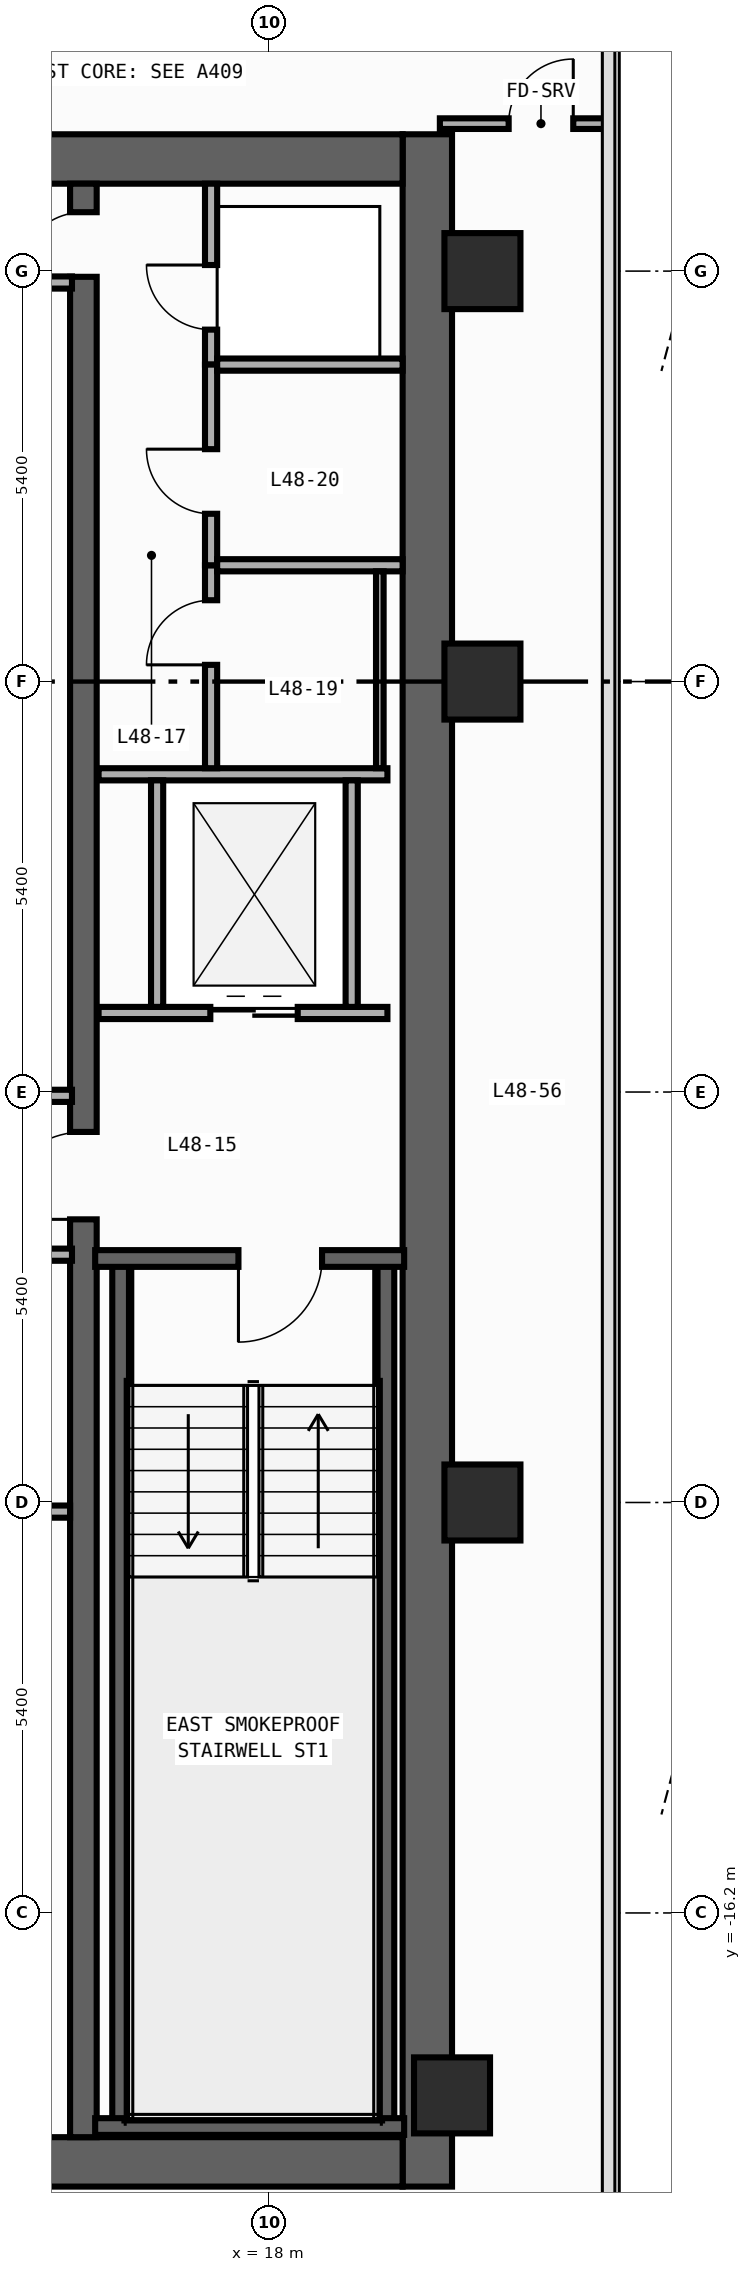
"""IFC4 building model, lengths in metres.
Left out: names, types, materials, properties, quantities, classifications, styles, units other than length and angle.
Written with IfcOpenShell. Run it as: python <this file> out.ifc"""

import sys

from ifc_helpers import new_model, si_unit, direction, frame, frame_2d, origin, origin_2d, place, context, subcontext, project, spatial, rectangle, extrude, element, fill, save


model = new_model("IFC4")
c1 = context("Model", 3, precision=1e-05, world=origin(), true_north=direction((0.0, 1.0)))
c2 = subcontext(c1, "Body", "Model", "MODEL_VIEW")
j1 = project(units=[si_unit("LENGTHUNIT", "METRE"), si_unit("PLANEANGLEUNIT", "RADIAN")], contexts=[c1])
p1 = place(None, origin())
s1 = spatial("IfcSite", under=j1, at=p1, CompositionType="ELEMENT")
p2 = place(p1, origin())
s2 = spatial("IfcBuilding", under=s1, at=p2, CompositionType="ELEMENT")
p3 = place(p2, frame((0.0, 0.0, 206.8)))
s3 = spatial("IfcBuildingStorey", under=s2, at=p3, CompositionType="ELEMENT", Elevation=206.8)
p4 = place(p3, frame((20.075, -19.8, 0.0), z_axis=(0.0, 0.0, 1.0), x_axis=(0.0, 1.0, 0.0)))
e1 = element("IfcWall", 1, at=p4, inside=s3, PredefinedType="SHEAR", context=c2, shape_type="SweptSolid", body=[
    extrude(rectangle(XDim=27.0, YDim=0.65, at=frame_2d((13.5, 0.0))), origin(), (0.0, 0.0, 1.0), 3.54),
])
for number, where, z_axis, x_axis in (
    (2, (12.65, -19.475, 0.0), (0.0, 0.0, 1.0), (1.0, 0.0, 0.0)),
    (3, (12.65, 6.875, 0.0), (0.0, 0.0, 1.0), (1.0, 0.0, 0.0)),
):
    element("IfcWall", number, at=place(p3, frame(where, z_axis=z_axis, x_axis=x_axis)), inside=s3, PredefinedType="SHEAR", context=c2, shape_type="SweptSolid", body=[
        extrude(rectangle(XDim=7.1, YDim=0.65, at=frame_2d((3.55, 0.0))), origin(), (0.0, 0.0, 1.0), 3.54),
    ])
p5 = place(p3, frame((15.55, -19.15, 0.0), z_axis=(0.0, 0.0, 1.0), x_axis=(0.0, 1.0, 0.0)))
e4 = element("IfcWall", 4, at=p5, inside=s3, PredefinedType="SHEAR", context=c2, shape_type="SweptSolid", body=[
    extrude(rectangle(XDim=25.7, YDim=0.35, at=frame_2d((12.85, 0.0))), origin(), (0.0, 0.0, 1.0), 3.54),
])
p6 = place(p5, frame((12.075, 0.0, 0.0)))
e5 = element("IfcOpeningElement", 5, at=p6, cuts=e4, PredefinedType="OPENING", context=c2, shape_type="SweptSolid", body=[
    extrude(rectangle(XDim=1.15, YDim=2.2, at=frame_2d((0.575, 1.1))), frame((0.0, 0.185, 0.0), z_axis=(0.0, -1.0, 0.0), x_axis=(1.0, 0.0, 0.0)), (0.0, 0.0, 1.0), 0.37),
])
p7 = place(p5, frame((24.475, 0.0, 0.0)))
e6 = element("IfcOpeningElement", 6, at=p7, cuts=e4, PredefinedType="OPENING", context=c2, shape_type="SweptSolid", body=[
    extrude(rectangle(XDim=0.85, YDim=2.1, at=frame_2d((0.425, 1.05))), frame((0.0, 0.185, 0.0), z_axis=(0.0, -1.0, 0.0), x_axis=(1.0, 0.0, 0.0)), (0.0, 0.0, 1.0), 0.37),
])
for number, where, z_axis, x_axis in (
    (7, (16.04, -19.01, 0.0), (0.0, 0.0, 1.0), (0.0, 1.0, 0.0)),
    (8, (19.53, -19.01, 0.0), (0.0, 0.0, 1.0), (0.0, 1.0, 0.0)),
):
    element("IfcWall", number, at=place(p3, frame(where, z_axis=z_axis, x_axis=x_axis)), inside=s3, PredefinedType="SHEAR", context=c2, shape_type="SweptSolid", body=[
        extrude(rectangle(XDim=11.42, YDim=0.22, at=frame_2d((5.71, 0.0))), origin(), (0.0, 0.0, 1.0), 3.54),
    ])
p8 = place(p3, frame((15.705, -19.01, 0.0), z_axis=(0.0, 0.0, 1.0), x_axis=(1.0, 0.0, 0.0)))
e9 = element("IfcWall", 9, at=p8, inside=s3, PredefinedType="SHEAR", context=c2, shape_type="SweptSolid", body=[
    extrude(rectangle(XDim=4.065, YDim=0.22, at=frame_2d((2.032, 0.0))), origin(), (0.0, 0.0, 1.0), 3.54),
])
p9 = place(p3, frame((19.77, -7.59, 0.0), z_axis=(0.0, 0.0, 1.0), x_axis=(-1.0, 0.0, 0.0)))
e10 = element("IfcWall", 10, at=p9, inside=s3, PredefinedType="SHEAR", context=c2, shape_type="SweptSolid", body=[
    extrude(rectangle(XDim=4.065, YDim=0.22, at=frame_2d((2.032, 0.0))), origin(), (0.0, 0.0, 1.0), 3.54),
])
p10 = place(p9, frame((1.08, 0.0, 0.0)))
e11 = element("IfcOpeningElement", 11, at=p10, cuts=e10, PredefinedType="OPENING", context=c2, shape_type="SweptSolid", body=[
    extrude(rectangle(XDim=1.1, YDim=2.2, at=frame_2d((0.55, 1.1))), frame((0.0, 0.12, 0.0), z_axis=(0.0, -1.0, 0.0), x_axis=(1.0, 0.0, 0.0)), (0.0, 0.0, 1.0), 0.24),
])
for number, where, z_axis, x_axis in (
    (12, (20.4, -18.6, 0.0), (0.0, 0.0, 1.0), (1.0, 0.0, 0.0)),
    (13, (20.8, -10.8, 0.0), (0.0, 0.0, 1.0), (1.0, 0.0, 0.0)),
    (14, (20.8, 0.0, 0.0), (0.0, 0.0, 1.0), (1.0, 0.0, 0.0)),
    (15, (20.8, 5.4, 0.0), (0.0, 0.0, 1.0), (1.0, 0.0, 0.0)),
):
    element("IfcColumn", number, at=place(p3, frame(where, z_axis=z_axis, x_axis=x_axis)), inside=s3, PredefinedType="COLUMN", context=c2, shape_type="SweptSolid", body=[
        extrude(rectangle(XDim=1.0, YDim=1.0, at=origin_2d()), origin(), (0.0, 0.0, 1.0), 3.8),
    ])
p11 = place(p3, frame((15.75, -4.36, 0.0), z_axis=(0.0, 0.0, 1.0), x_axis=(1.0, 0.0, 0.0)))
e16 = element("IfcWall", 16, at=p11, inside=s3, PredefinedType="STANDARD", context=c2, shape_type="SweptSolid", body=[
    extrude(rectangle(XDim=3.8, YDim=0.16, at=frame_2d((1.9, 0.0))), origin(), (0.0, 0.0, 1.0), 3.54),
])
p12 = place(p11, frame((1.47, 0.0, 0.0)))
e17 = element("IfcOpeningElement", 17, at=p12, cuts=e16, PredefinedType="OPENING", context=c2, shape_type="SweptSolid", body=[
    extrude(rectangle(XDim=1.15, YDim=2.2, at=frame_2d((0.575, 1.1))), frame((0.0, 0.09, 0.0), z_axis=(0.0, -1.0, 0.0), x_axis=(1.0, 0.0, 0.0)), (0.0, 0.0, 1.0), 0.18),
])
p13 = place(p3, frame((15.75, -1.22, 0.0), z_axis=(0.0, 0.0, 1.0), x_axis=(1.0, 0.0, 0.0)))
e18 = element("IfcWall", 18, at=p13, inside=s3, PredefinedType="STANDARD", context=c2, shape_type="SweptSolid", body=[
    extrude(rectangle(XDim=3.8, YDim=0.16, at=frame_2d((1.9, 0.0))), origin(), (0.0, 0.0, 1.0), 3.54),
])
for number, where, z_axis, x_axis in (
    (19, (16.52, -4.28, 0.0), (0.0, 0.0, 1.0), (0.0, 1.0, 0.0)),
    (20, (19.08, -4.28, 0.0), (0.0, 0.0, 1.0), (0.0, 1.0, 0.0)),
):
    element("IfcWall", number, at=place(p3, frame(where, z_axis=z_axis, x_axis=x_axis)), inside=s3, PredefinedType="STANDARD", context=c2, shape_type="SweptSolid", body=[
        extrude(rectangle(XDim=2.98, YDim=0.16, at=frame_2d((1.49, 0.0))), origin(), (0.0, 0.0, 1.0), 3.54),
    ])
for number, where, z_axis, x_axis in (
    (21, (12.8, -5.45, 0.0), (0.0, 0.0, 1.0), (1.0, 0.0, 0.0)),
    (22, (12.8, -7.54, 0.0), (0.0, 0.0, 1.0), (1.0, 0.0, 0.0)),
    (23, (12.8, 5.25, 0.0), (0.0, 0.0, 1.0), (1.0, 0.0, 0.0)),
):
    element("IfcWall", number, at=place(p3, frame(where, z_axis=z_axis, x_axis=x_axis)), inside=s3, PredefinedType="STANDARD", context=c2, shape_type="SweptSolid", body=[
        extrude(rectangle(XDim=2.6, YDim=0.16, at=frame_2d((1.3, 0.0))), origin(), (0.0, 0.0, 1.0), 3.54),
    ])
p14 = place(p3, frame((17.23, 4.17, 0.0), z_axis=(0.0, 0.0, 1.0), x_axis=(0.0, 1.0, 0.0)))
e24 = element("IfcWall", 24, at=p14, inside=s3, PredefinedType="PARTITIONING", context=c2, shape_type="SweptSolid", body=[
    extrude(rectangle(XDim=2.38, YDim=0.16, at=frame_2d((1.19, 0.0))), origin(), (0.0, 0.0, 1.0), 3.54),
])
p15 = place(p14, frame((0.46, 0.0, 0.0)))
e25 = element("IfcOpeningElement", 25, at=p15, cuts=e24, PredefinedType="OPENING", context=c2, shape_type="SweptSolid", body=[
    extrude(rectangle(XDim=0.85, YDim=2.1, at=frame_2d((0.425, 1.05))), frame((0.0, 0.09, 0.0), z_axis=(0.0, -1.0, 0.0), x_axis=(1.0, 0.0, 0.0)), (0.0, 0.0, 1.0), 0.18),
])
p16 = place(p3, frame((17.23, -1.14, 0.0), z_axis=(0.0, 0.0, 1.0), x_axis=(0.0, 1.0, 0.0)))
e26 = element("IfcWall", 26, at=p16, inside=s3, PredefinedType="PARTITIONING", context=c2, shape_type="SweptSolid", body=[
    extrude(rectangle(XDim=2.67, YDim=0.16, at=frame_2d((1.335, 0.0))), origin(), (0.0, 0.0, 1.0), 3.54),
])
p17 = place(p16, frame((1.36, 0.0, 0.0)))
e27 = element("IfcOpeningElement", 27, at=p17, cuts=e26, PredefinedType="OPENING", context=c2, shape_type="SweptSolid", body=[
    extrude(rectangle(XDim=0.85, YDim=2.1, at=frame_2d((0.425, 1.05))), frame((0.0, 0.09, 0.0), z_axis=(0.0, -1.0, 0.0), x_axis=(1.0, 0.0, 0.0)), (0.0, 0.0, 1.0), 0.18),
])
p18 = place(p3, frame((17.23, 1.53, 0.0), z_axis=(0.0, 0.0, 1.0), x_axis=(0.0, 1.0, 0.0)))
e28 = element("IfcWall", 28, at=p18, inside=s3, PredefinedType="PARTITIONING", context=c2, shape_type="SweptSolid", body=[
    extrude(rectangle(XDim=2.64, YDim=0.16, at=frame_2d((1.32, 0.0))), origin(), (0.0, 0.0, 1.0), 3.54),
])
p19 = place(p18, frame((0.677, 0.0, 0.0)))
e29 = element("IfcOpeningElement", 29, at=p19, cuts=e28, PredefinedType="OPENING", context=c2, shape_type="SweptSolid", body=[
    extrude(rectangle(XDim=0.85, YDim=2.1, at=frame_2d((0.425, 1.05))), frame((0.0, 0.09, 0.0), z_axis=(0.0, -1.0, 0.0), x_axis=(1.0, 0.0, 0.0)), (0.0, 0.0, 1.0), 0.18),
])
for number, where, z_axis, x_axis in (
    (30, (17.31, 4.17, 0.0), (0.0, 0.0, 1.0), (1.0, 0.0, 0.0)),
    (31, (17.31, 1.53, 0.0), (0.0, 0.0, 1.0), (1.0, 0.0, 0.0)),
):
    element("IfcWall", number, at=place(p3, frame(where, z_axis=z_axis, x_axis=x_axis)), inside=s3, PredefinedType="PARTITIONING", context=c2, shape_type="SweptSolid", body=[
        extrude(rectangle(XDim=2.44, YDim=0.16, at=frame_2d((1.22, 0.0))), origin(), (0.0, 0.0, 1.0), 3.54),
    ])
p20 = place(p3, frame((12.31, -10.92, 0.0), z_axis=(0.0, 0.0, 1.0), x_axis=(1.0, 0.0, 0.0)))
e32 = element("IfcWall", 32, at=p20, inside=s3, PredefinedType="PARTITIONING", context=c2, shape_type="SweptSolid", body=[
    extrude(rectangle(XDim=3.065, YDim=0.16, at=frame_2d((1.532, 0.0))), origin(), (0.0, 0.0, 1.0), 2.952),
])
p21 = place(p3, frame((20.24, 7.34, 0.0), z_axis=(0.0, 0.0, 1.0), x_axis=(1.0, 0.0, 0.0)))
e33 = element("IfcWall", 33, at=p21, inside=s3, PredefinedType="PARTITIONING", context=c2, shape_type="SweptSolid", body=[
    extrude(rectangle(XDim=2.215, YDim=0.14, at=frame_2d((1.107, 0.0))), origin(), (0.0, 0.0, 1.0), 3.54),
])
p22 = place(p21, frame((0.905, 0.0, 0.0)))
e34 = element("IfcOpeningElement", 34, at=p22, cuts=e33, PredefinedType="OPENING", context=c2, shape_type="SweptSolid", body=[
    extrude(rectangle(XDim=0.85, YDim=2.1, at=frame_2d((0.425, 1.05))), frame((0.0, 0.08, 0.0), z_axis=(0.0, -1.0, 0.0), x_axis=(1.0, 0.0, 0.0)), (0.0, 0.0, 1.0), 0.16),
])
p23 = place(p3, frame((19.45, 1.45, 0.0), z_axis=(0.0, 0.0, 1.0), x_axis=(0.0, -1.0, 0.0)))
e35 = element("IfcWall", 35, at=p23, inside=s3, PredefinedType="PARTITIONING", context=c2, shape_type="SweptSolid", body=[
    extrude(rectangle(XDim=2.59, YDim=0.1, at=frame_2d((1.295, 0.0))), origin(), (0.0, 0.0, 1.0), 3.54),
])
p24 = place(p10, origin())
e36 = element("IfcDoor", 36, at=p24, inside=s3, OperationType="SINGLE_SWING_RIGHT", PredefinedType="DOOR", context=c2, shape_type="SweptSolid", body=[
    extrude(rectangle(XDim=1.1, YDim=2.2, at=frame_2d((0.55, 1.1))), frame((0.0, 0.025, 0.0), z_axis=(0.0, -1.0, 0.0), x_axis=(1.0, 0.0, 0.0)), (0.0, 0.0, 1.0), 0.05),
])
fill(e11, e36)
p25 = place(p6, origin())
e37 = element("IfcDoor", 37, at=p25, inside=s3, OperationType="SINGLE_SWING_LEFT", PredefinedType="DOOR", context=c2, shape_type="SweptSolid", body=[
    extrude(rectangle(XDim=1.15, YDim=2.2, at=frame_2d((0.575, 1.1))), frame((0.0, 0.025, 0.0), z_axis=(0.0, -1.0, 0.0), x_axis=(1.0, 0.0, 0.0)), (0.0, 0.0, 1.0), 0.05),
])
fill(e5, e37)
p26 = place(p7, origin())
e38 = element("IfcDoor", 38, at=p26, inside=s3, OperationType="SINGLE_SWING_LEFT", PredefinedType="DOOR", context=c2, shape_type="SweptSolid", body=[
    extrude(rectangle(XDim=0.85, YDim=2.1, at=frame_2d((0.425, 1.05))), frame((0.0, 0.025, 0.0), z_axis=(0.0, -1.0, 0.0), x_axis=(1.0, 0.0, 0.0)), (0.0, 0.0, 1.0), 0.05),
])
fill(e6, e38)
p27 = place(p12, origin())
e39 = element("IfcDoor", 39, at=p27, inside=s3, OperationType="DOUBLE_DOOR_SLIDING", PredefinedType="DOOR", context=c2, shape_type="SweptSolid", body=[
    extrude(rectangle(XDim=1.15, YDim=2.2, at=frame_2d((0.575, 1.1))), frame((0.0, 0.025, 0.0), z_axis=(0.0, -1.0, 0.0), x_axis=(1.0, 0.0, 0.0)), (0.0, 0.0, 1.0), 0.05),
])
fill(e17, e39)
p28 = place(p15, origin())
e40 = element("IfcDoor", 40, at=p28, inside=s3, OperationType="SINGLE_SWING_RIGHT", PredefinedType="DOOR", context=c2, shape_type="SweptSolid", body=[
    extrude(rectangle(XDim=0.85, YDim=2.1, at=frame_2d((0.425, 1.05))), frame((0.0, 0.025, 0.0), z_axis=(0.0, -1.0, 0.0), x_axis=(1.0, 0.0, 0.0)), (0.0, 0.0, 1.0), 0.05),
])
fill(e25, e40)
p29 = place(p17, origin())
e41 = element("IfcDoor", 41, at=p29, inside=s3, OperationType="SINGLE_SWING_LEFT", PredefinedType="DOOR", context=c2, shape_type="SweptSolid", body=[
    extrude(rectangle(XDim=0.85, YDim=2.1, at=frame_2d((0.425, 1.05))), frame((0.0, 0.025, 0.0), z_axis=(0.0, -1.0, 0.0), x_axis=(1.0, 0.0, 0.0)), (0.0, 0.0, 1.0), 0.05),
])
fill(e27, e41)
p30 = place(p19, origin())
e42 = element("IfcDoor", 42, at=p30, inside=s3, OperationType="SINGLE_SWING_RIGHT", PredefinedType="DOOR", context=c2, shape_type="SweptSolid", body=[
    extrude(rectangle(XDim=0.85, YDim=2.1, at=frame_2d((0.425, 1.05))), frame((0.0, 0.025, 0.0), z_axis=(0.0, -1.0, 0.0), x_axis=(1.0, 0.0, 0.0)), (0.0, 0.0, 1.0), 0.05),
])
fill(e29, e42)
p31 = place(p22, origin())
e43 = element("IfcDoor", 43, at=p31, inside=s3, OperationType="SINGLE_SWING_RIGHT", PredefinedType="DOOR", context=c2, shape_type="SweptSolid", body=[
    extrude(rectangle(XDim=0.85, YDim=2.1, at=frame_2d((0.425, 1.05))), frame((0.0, 0.025, 0.0), z_axis=(0.0, -1.0, 0.0), x_axis=(1.0, 0.0, 0.0)), (0.0, 0.0, 1.0), 0.05),
])
fill(e34, e43)
save(model, sys.argv[1])
